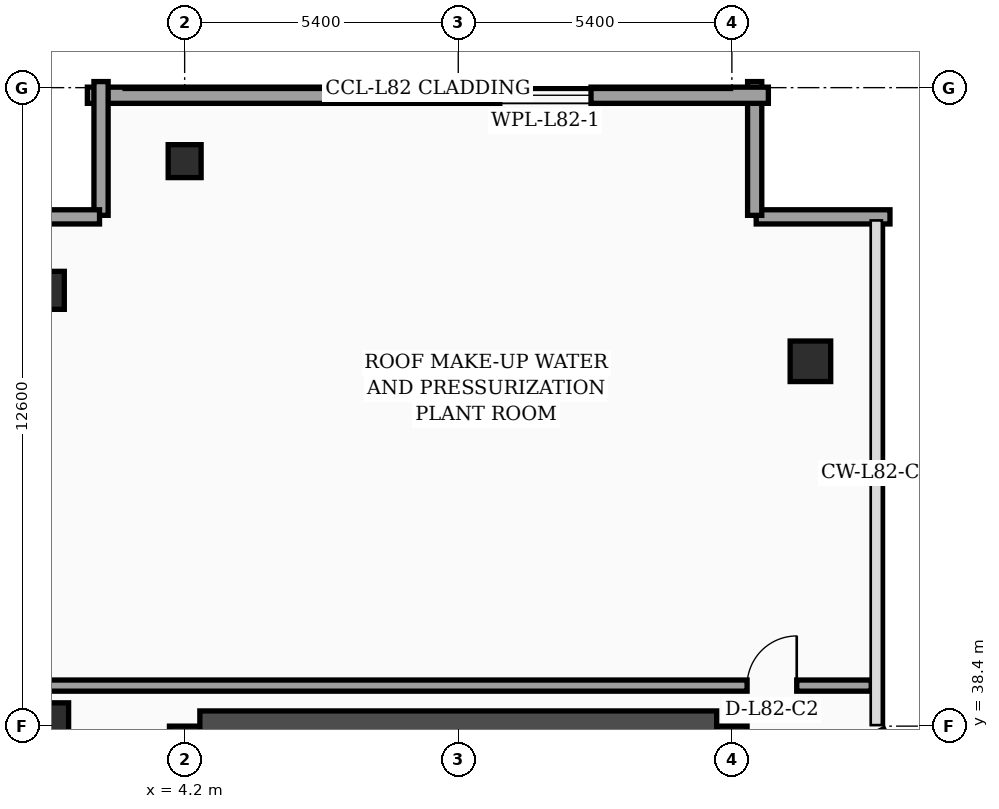
"""IFC4 building model, lengths in metres.
Left out: names, types, materials, properties, quantities, classifications, styles, units other than length and angle.
Written with IfcOpenShell. Run it as: python <this file> out.ifc"""

import sys

from ifc_helpers import new_model, si_unit, direction, frame, frame_2d, origin, origin_2d, place, context, subcontext, project, spatial, rectangle, hollow_rectangle, extrude, element, fill, save


model = new_model("IFC4")
c1 = context("Model", 3, precision=1e-05, world=origin(), true_north=direction((0.0, 1.0)))
c2 = subcontext(c1, "Body", "Model", "MODEL_VIEW")
j1 = project(units=[si_unit("LENGTHUNIT", "METRE"), si_unit("PLANEANGLEUNIT", "RADIAN")], contexts=[c1])
p1 = place(None, origin())
s1 = spatial("IfcSite", under=j1, at=p1, CompositionType="ELEMENT")
p2 = place(p1, origin())
s2 = spatial("IfcBuilding", under=s1, at=p2, CompositionType="ELEMENT")
p3 = place(p2, frame((0.0, 0.0, 335.5)))
s3 = spatial("IfcBuildingStorey", under=s2, at=p3, CompositionType="ELEMENT", Elevation=335.5)
p4 = place(p3, frame((4.2, 16.8, 0.0), z_axis=(0.0, 0.0, 1.0), x_axis=(0.0, 1.0, 0.0)))
e1 = element("IfcWall", 1, at=p4, inside=s3, PredefinedType="SHEAR", context=c2, shape_type="SweptSolid", body=[
    extrude(rectangle(XDim=21.6, YDim=0.6, at=frame_2d((10.8, 0.0))), origin(), (0.0, 0.0, 1.0), 4.76),
])
p5 = place(p3, frame((15.0, 16.8, 0.0), z_axis=(0.0, 0.0, 1.0), x_axis=(0.0, 1.0, 0.0)))
e2 = element("IfcWall", 2, at=p5, inside=s3, PredefinedType="SHEAR", context=c2, shape_type="SweptSolid", body=[
    extrude(rectangle(XDim=21.6, YDim=0.6, at=frame_2d((10.8, 0.0))), origin(), (0.0, 0.0, 1.0), 4.76),
])
p6 = place(p5, frame((8.65, 0.0, 0.0)))
e3 = element("IfcOpeningElement", 3, at=p6, cuts=e2, PredefinedType="OPENING", context=c2, shape_type="SweptSolid", body=[
    extrude(rectangle(XDim=1.1, YDim=2.2, at=frame_2d((0.55, 1.1))), frame((0.0, 0.31, 0.0), z_axis=(0.0, -1.0, 0.0), x_axis=(1.0, 0.0, 0.0)), (0.0, 0.0, 1.0), 0.62),
])
p7 = place(p3, frame((4.5, 38.4, 0.0), z_axis=(0.0, 0.0, 1.0), x_axis=(1.0, 0.0, 0.0)))
e4 = element("IfcWall", 4, at=p7, inside=s3, PredefinedType="SHEAR", context=c2, shape_type="SweptSolid", body=[
    extrude(rectangle(XDim=10.2, YDim=0.6, at=frame_2d((5.1, 0.0))), origin(), (0.0, 0.0, 1.0), 4.76),
])
p8 = place(p3, frame((1.45, 38.4, 0.0), z_axis=(0.0, 0.0, 1.0), x_axis=(1.0, 0.0, 0.0)))
e5 = element("IfcColumn", 5, at=p8, inside=s3, PredefinedType="COLUMN", context=c2, shape_type="SweptSolid", body=[
    extrude(rectangle(XDim=0.92, YDim=0.92, at=origin_2d()), origin(), (0.0, 0.0, 1.0), 4.76),
])
p9 = place(p3, frame((1.45, 47.0, 0.0), z_axis=(0.0, 0.0, 1.0), x_axis=(1.0, 0.0, 0.0)))
e6 = element("IfcColumn", 6, at=p9, inside=s3, PredefinedType="COLUMN", context=c2, shape_type="SweptSolid", body=[
    extrude(hollow_rectangle(XDim=0.75, YDim=0.75, WallThickness=0.032, at=origin_2d()), origin(), (0.0, 0.0, 1.0), 4.76),
])
p10 = place(p3, frame((4.2, 49.55, 0.0), z_axis=(0.0, 0.0, 1.0), x_axis=(1.0, 0.0, 0.0)))
e7 = element("IfcColumn", 7, at=p10, inside=s3, PredefinedType="COLUMN", context=c2, shape_type="SweptSolid", body=[
    extrude(hollow_rectangle(XDim=0.65, YDim=0.65, WallThickness=0.028, at=origin_2d()), origin(), (0.0, 0.0, 1.0), 4.76),
])
p11 = place(p3, frame((16.55, 45.6, 0.0), z_axis=(0.0, 0.0, 1.0), x_axis=(1.0, 0.0, 0.0)))
e8 = element("IfcColumn", 8, at=p11, inside=s3, PredefinedType="COLUMN", context=c2, shape_type="SweptSolid", body=[
    extrude(rectangle(XDim=0.8, YDim=0.8, at=origin_2d()), origin(), (0.0, 0.0, 1.0), 4.76),
])
for number, where, z_axis, x_axis in (
    (9, (18.12, 48.45, 0.0), (0.0, 0.0, 1.0), (-1.0, 0.0, 0.0)),
    (10, (15.45, 48.48, 0.0), (0.0, 0.0, 1.0), (0.0, 1.0, 0.0)),
):
    element("IfcWall", number, at=place(p3, frame(where, z_axis=z_axis, x_axis=x_axis)), inside=s3, PredefinedType="SOLIDWALL", context=c2, shape_type="SweptSolid", body=[
        extrude(rectangle(XDim=2.64, YDim=0.28, at=frame_2d((1.32, 0.0))), origin(), (0.0, 0.0, 1.0), 4.76),
    ])
p12 = place(p3, frame((15.72, 50.85, 0.0), z_axis=(0.0, 0.0, 1.0), x_axis=(-1.0, 0.0, 0.0)))
e11 = element("IfcWall", 11, at=p12, inside=s3, PredefinedType="SOLIDWALL", context=c2, shape_type="SweptSolid", body=[
    extrude(rectangle(XDim=13.44, YDim=0.32, at=frame_2d((6.72, 0.0))), origin(), (0.0, 0.0, 1.0), 4.76),
])
p13 = place(p12, frame((3.5, 0.0, 1.1)))
e12 = element("IfcOpeningElement", 12, at=p13, cuts=e11, PredefinedType="OPENING", context=c2, shape_type="SweptSolid", body=[
    extrude(rectangle(XDim=1.8, YDim=1.5, at=frame_2d((0.9, 0.75))), frame((0.0, 0.17, 0.0), z_axis=(0.0, -1.0, 0.0), x_axis=(1.0, 0.0, 0.0)), (0.0, 0.0, 1.0), 0.34),
])
for number, where, z_axis, x_axis in (
    (13, (2.55, 51.12, 0.0), (0.0, 0.0, 1.0), (0.0, -1.0, 0.0)),
    (14, (2.52, 48.45, 0.0), (0.0, 0.0, 1.0), (-1.0, 0.0, 0.0)),
):
    element("IfcWall", number, at=place(p3, frame(where, z_axis=z_axis, x_axis=x_axis)), inside=s3, PredefinedType="SOLIDWALL", context=c2, shape_type="SweptSolid", body=[
        extrude(rectangle(XDim=2.64, YDim=0.28, at=frame_2d((1.32, 0.0))), origin(), (0.0, 0.0, 1.0), 4.76),
    ])
p14 = place(p3, frame((0.08, 39.2, 0.0), z_axis=(0.0, 0.0, 1.0), x_axis=(1.0, 0.0, 0.0)))
e15 = element("IfcWall", 15, at=p14, inside=s3, PredefinedType="SOLIDWALL", context=c2, shape_type="SweptSolid", body=[
    extrude(rectangle(XDim=17.67, YDim=0.22, at=frame_2d((8.835, 0.0))), origin(), (0.0, 0.0, 1.0), 4.19),
])
p15 = place(p14, frame((15.22, 0.0, 0.0)))
e16 = element("IfcOpeningElement", 16, at=p15, cuts=e15, PredefinedType="OPENING", context=c2, shape_type="SweptSolid", body=[
    extrude(rectangle(XDim=0.98, YDim=2.15, at=frame_2d((0.49, 1.075))), frame((0.0, 0.12, 0.0), z_axis=(0.0, -1.0, 0.0), x_axis=(1.0, 0.0, 0.0)), (0.0, 0.0, 1.0), 0.24),
])
p16 = place(p13, origin())
e17 = element("IfcWindow", 17, at=p16, inside=s3, PartitioningType="SINGLE_PANEL", PredefinedType="WINDOW", context=c2, shape_type="SweptSolid", body=[
    extrude(rectangle(XDim=1.8, YDim=1.5, at=frame_2d((0.9, 0.75))), frame((0.0, 0.03, 0.0), z_axis=(0.0, -1.0, 0.0), x_axis=(1.0, 0.0, 0.0)), (0.0, 0.0, 1.0), 0.06),
])
fill(e12, e17)
p17 = place(p15, origin())
e18 = element("IfcDoor", 18, at=p17, inside=s3, OperationType="SINGLE_SWING_RIGHT", PredefinedType="DOOR", context=c2, shape_type="SweptSolid", body=[
    extrude(rectangle(XDim=0.98, YDim=2.15, at=frame_2d((0.49, 1.075))), frame((0.0, 0.025, 0.0), z_axis=(0.0, -1.0, 0.0), x_axis=(1.0, 0.0, 0.0)), (0.0, 0.0, 1.0), 0.05),
])
fill(e16, e18)
save(model, sys.argv[1])
